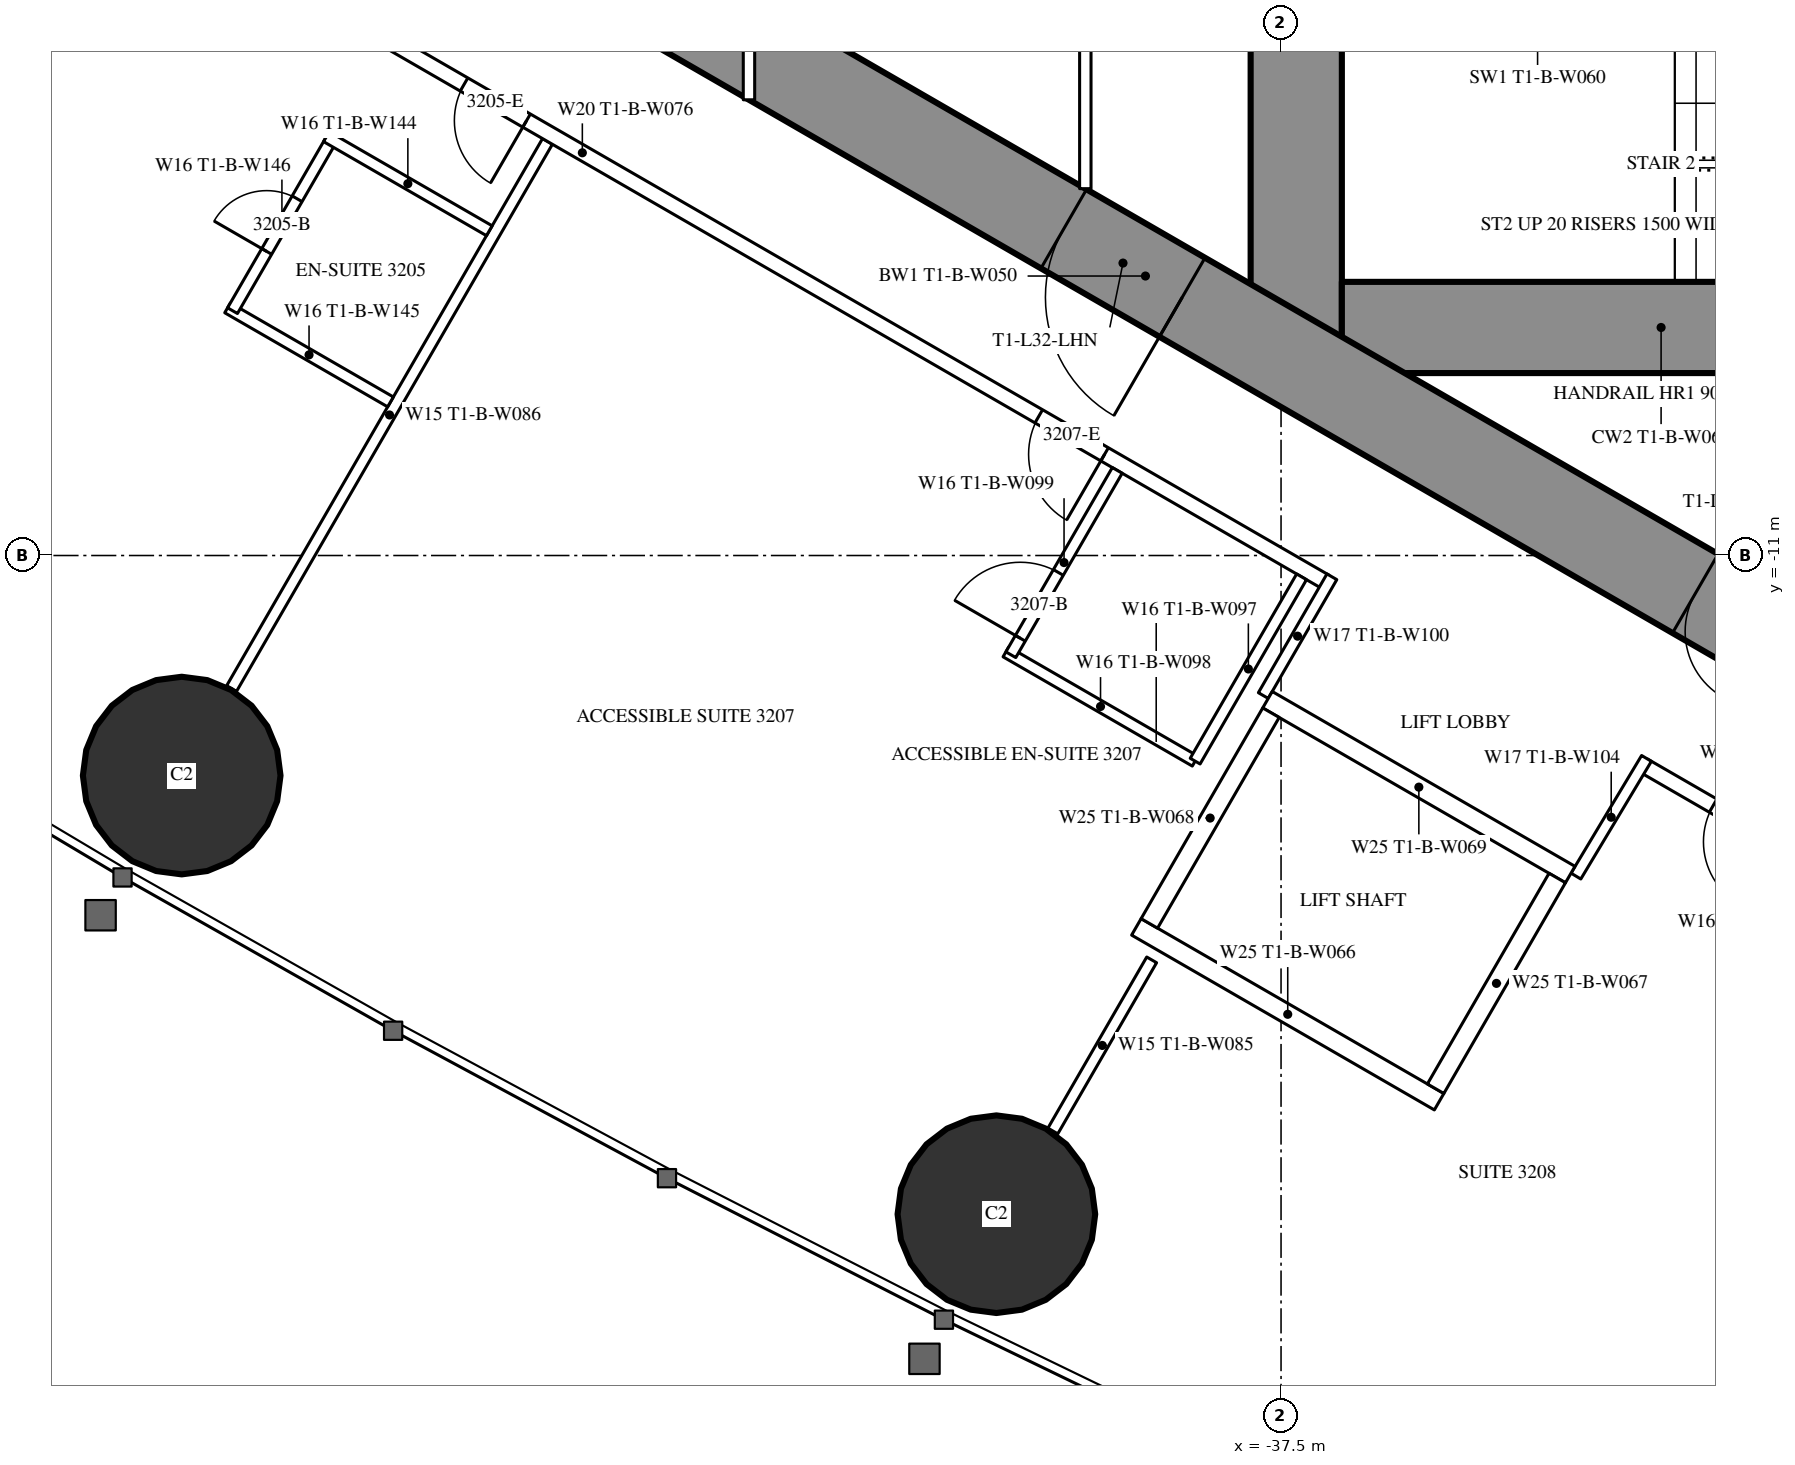
"""IFC4 building model, lengths in metres.
Left out: names, types, materials, properties, quantities, classifications, styles, units other than length and angle.
Written with IfcOpenShell. Run it as: python <this file> out.ifc"""

import sys

from ifc_helpers import new_model, si_unit, direction, frame, frame_2d, origin, origin_2d, place, context, subcontext, project, spatial, rectangle, hollow_circle, extrude, element, fill, save


model = new_model("IFC4")
c1 = context("Model", 3, precision=1e-05, world=origin(), true_north=direction((0.0, 1.0)))
c2 = subcontext(c1, "Body", "Model", "MODEL_VIEW")
j1 = project(units=[si_unit("LENGTHUNIT", "METRE"), si_unit("PLANEANGLEUNIT", "RADIAN")], contexts=[c1])
p1 = place(None, origin())
s1 = spatial("IfcSite", under=j1, at=p1, CompositionType="ELEMENT")
p2 = place(p1, origin())
s2 = spatial("IfcBuilding", under=s1, at=p2, CompositionType="ELEMENT")
p3 = place(p2, frame((0.0, 0.0, 122.1)))
s3 = spatial("IfcBuildingStorey", under=s2, at=p3, CompositionType="ELEMENT", Elevation=122.1)
for number, where, z_axis, x_axis in (
    (1, (-51.963, -13.895, 0.0), (0.0, 0.0, 1.0), (1.0, 0.0, 0.0)),
    (2, (-41.245, -19.666, 0.0), (0.0, 0.0, 1.0), (1.0, 0.0, 0.0)),
):
    element("IfcColumn", number, at=place(p3, frame(where, z_axis=z_axis, x_axis=x_axis)), inside=s3, PredefinedType="COLUMN", context=c2, shape_type="SweptSolid", body=[
        extrude(hollow_circle(Radius=1.3, WallThickness=0.1, at=origin_2d()), origin(), (0.0, 0.0, 1.0), 3.5),
    ])
p4 = place(p3, frame((-37.3, 8.6, 0.0), z_axis=(0.0, 0.0, 1.0), x_axis=(0.0, -1.0, 0.0)))
e3 = element("IfcWall", 3, at=p4, inside=s3, PredefinedType="SHEAR", context=c2, shape_type="SweptSolid", body=[
    extrude(rectangle(XDim=17.2, YDim=1.2, at=frame_2d((8.6, 0.0))), origin(), (0.0, 0.0, 1.0), 3.5),
])
p5 = place(p4, frame((7.7, 0.0, 0.0)))
e4 = element("IfcOpeningElement", 4, at=p5, cuts=e3, PredefinedType="OPENING", context=c2, shape_type="SweptSolid", body=[
    extrude(rectangle(XDim=1.8, YDim=2.2, at=frame_2d((0.9, 1.1))), frame((0.0, 0.61, 0.0), z_axis=(0.0, -1.0, 0.0), x_axis=(1.0, 0.0, 0.0)), (0.0, 0.0, 1.0), 1.22),
])
p6 = place(p3, frame((-28.3, -8.0, 0.0), z_axis=(0.0, 0.0, 1.0), x_axis=(-1.0, 0.0, 0.0)))
e5 = element("IfcWall", 5, at=p6, inside=s3, PredefinedType="SHEAR", context=c2, shape_type="SweptSolid", body=[
    extrude(rectangle(XDim=8.4, YDim=1.2, at=frame_2d((4.2, 0.0))), origin(), (0.0, 0.0, 1.0), 3.5),
])
p7 = place(p6, frame((0.25, 0.0, 0.0)))
e6 = element("IfcOpeningElement", 6, at=p7, cuts=e5, PredefinedType="OPENING", context=c2, shape_type="SweptSolid", body=[
    extrude(rectangle(XDim=1.0, YDim=2.2, at=frame_2d((0.5, 1.1))), frame((0.0, 0.61, 0.0), z_axis=(0.0, -1.0, 0.0), x_axis=(1.0, 0.0, 0.0)), (0.0, 0.0, 1.0), 1.22),
])
p8 = place(p3, frame((-27.2, -14.3, 0.0), z_axis=(0.0, 0.0, 1.0), x_axis=(-0.866024021859, 0.500002393557, 0.0)))
e7 = element("IfcWall", 7, at=p8, inside=s3, PredefinedType="SHEAR", context=c2, shape_type="SweptSolid", body=[
    extrude(rectangle(XDim=27.907, YDim=1.2, at=frame_2d((13.954, 0.0))), origin(), (0.0, 0.0, 1.0), 3.5),
])
p9 = place(p8, frame((4.6, 0.0, 0.0)))
e8 = element("IfcOpeningElement", 8, at=p9, cuts=e7, PredefinedType="OPENING", context=c2, shape_type="SweptSolid", body=[
    extrude(rectangle(XDim=1.0, YDim=2.2, at=frame_2d((0.5, 1.1))), frame((0.0, 0.61, 0.0), z_axis=(0.0, -1.0, 0.0), x_axis=(1.0, 0.0, 0.0)), (0.0, 0.0, 1.0), 1.22),
])
p10 = place(p8, frame((13.395, 0.0, 0.0)))
e9 = element("IfcOpeningElement", 9, at=p10, cuts=e7, PredefinedType="OPENING", context=c2, shape_type="SweptSolid", body=[
    extrude(rectangle(XDim=1.8, YDim=2.2, at=frame_2d((0.9, 1.1))), frame((0.0, 0.61, 0.0), z_axis=(0.0, -1.0, 0.0), x_axis=(1.0, 0.0, 0.0)), (0.0, 0.0, 1.0), 1.22),
])
p11 = place(p3, frame((-47.151, -5.552, 0.0), z_axis=(0.0, 0.0, 1.0), x_axis=(-0.500003012045, -0.866023664773, 0.0)))
e10 = element("IfcWall", 10, at=p11, inside=s3, PredefinedType="PARTITIONING", context=c2, shape_type="SweptSolid", body=[
    extrude(rectangle(XDim=8.311, YDim=0.15, at=frame_2d((4.156, 0.0))), origin(), (0.0, 0.0, 1.0), 2.2),
])
p12 = place(p3, frame((-39.202, -16.32, 0.0), z_axis=(0.0, 0.0, 1.0), x_axis=(-0.49997716683, -0.86603858612, 0.0)))
e11 = element("IfcWall", 11, at=p12, inside=s3, PredefinedType="PARTITIONING", context=c2, shape_type="SweptSolid", body=[
    extrude(rectangle(XDim=2.6, YDim=0.15, at=frame_2d((1.3, 0.0))), origin(), (0.0, 0.0, 1.0), 3.25),
])
p13 = place(p3, frame((-27.572, -16.741, 0.0), z_axis=(0.0, 0.0, 1.0), x_axis=(-0.866024464444, 0.500001626982, 0.0)))
e12 = element("IfcWall", 12, at=p13, inside=s3, PredefinedType="PARTITIONING", context=c2, shape_type="SweptSolid", body=[
    extrude(rectangle(XDim=5.955, YDim=0.2, at=frame_2d((2.978, 0.0))), origin(), (0.0, 0.0, 1.0), 3.25),
])
p14 = place(p13, frame((3.95, 0.0, 0.0)))
e13 = element("IfcOpeningElement", 13, at=p14, cuts=e12, PredefinedType="OPENING", context=c2, shape_type="SweptSolid", body=[
    extrude(rectangle(XDim=0.95, YDim=2.2, at=frame_2d((0.475, 1.1))), frame((0.0, 0.11, 0.0), z_axis=(0.0, -1.0, 0.0), x_axis=(1.0, 0.0, 0.0)), (0.0, 0.0, 1.0), 0.22),
])
p15 = place(p3, frame((-36.92, -11.344, 0.0), z_axis=(0.0, 0.0, 1.0), x_axis=(-0.866028313256, 0.499994960614, 0.0)))
e14 = element("IfcWall", 14, at=p15, inside=s3, PredefinedType="PARTITIONING", context=c2, shape_type="SweptSolid", body=[
    extrude(rectangle(XDim=22.568, YDim=0.2, at=frame_2d((11.284, 0.0))), origin(), (0.0, 0.0, 1.0), 3.25),
])
p16 = place(p15, frame((12.131, 0.0, 0.0)))
e15 = element("IfcOpeningElement", 15, at=p16, cuts=e14, PredefinedType="OPENING", context=c2, shape_type="SweptSolid", body=[
    extrude(rectangle(XDim=0.95, YDim=2.2, at=frame_2d((0.475, 1.1))), frame((0.0, 0.11, 0.0), z_axis=(0.0, -1.0, 0.0), x_axis=(1.0, 0.0, 0.0)), (0.0, 0.0, 1.0), 0.22),
])
p17 = place(p15, frame((3.35, 0.0, 0.0)))
e16 = element("IfcOpeningElement", 16, at=p17, cuts=e14, PredefinedType="OPENING", context=c2, shape_type="SweptSolid", body=[
    extrude(rectangle(XDim=1.0, YDim=2.2, at=frame_2d((0.5, 1.1))), frame((0.0, 0.11, 0.0), z_axis=(0.0, -1.0, 0.0), x_axis=(1.0, 0.0, 0.0)), (0.0, 0.0, 1.0), 0.22),
])
p18 = place(p3, frame((-36.831, -11.28, 0.0), z_axis=(0.0, 0.0, 1.0), x_axis=(-0.499937177781, -0.866061671171, 0.0)))
e17 = element("IfcWall", 17, at=p18, inside=s3, PredefinedType="PARTITIONING", context=c2, shape_type="SweptSolid", body=[
    extrude(rectangle(XDim=1.804, YDim=0.15, at=frame_2d((0.902, 0.0))), origin(), (0.0, 0.0, 1.0), 3.25),
])
p19 = place(p3, frame((-33.621, -15.218, 0.0), z_axis=(0.0, 0.0, 1.0), x_axis=(0.514336634837, 0.857588377991, 0.0)))
e18 = element("IfcWall", 18, at=p19, inside=s3, PredefinedType="PARTITIONING", context=c2, shape_type="SweptSolid", body=[
    extrude(rectangle(XDim=1.805, YDim=0.15, at=frame_2d((0.903, 0.0))), origin(), (0.0, 0.0, 1.0), 3.25),
])
p20 = place(p3, frame((-49.216, -8.979, 0.0), z_axis=(0.0, 0.0, 1.0), x_axis=(-0.866031185235, 0.4999899861, 0.0)))
e19 = element("IfcWall", 19, at=p20, inside=s3, PredefinedType="PARTITIONING", context=c2, shape_type="SweptSolid", body=[
    extrude(rectangle(XDim=2.475, YDim=0.15, at=frame_2d((1.238, 0.0))), origin(), (0.0, 0.0, 1.0), 3.25),
])
p21 = place(p3, frame((-49.995, -5.527, 0.0), z_axis=(0.0, 0.0, 1.0), x_axis=(-0.500006934395, -0.866021400173, 0.0)))
e20 = element("IfcWall", 20, at=p21, inside=s3, PredefinedType="PARTITIONING", context=c2, shape_type="SweptSolid", body=[
    extrude(rectangle(XDim=2.6, YDim=0.15, at=frame_2d((1.3, 0.0))), origin(), (0.0, 0.0, 1.0), 3.25),
])
p22 = place(p21, frame((0.9, 0.0, 0.0)))
e21 = element("IfcOpeningElement", 21, at=p22, cuts=e20, PredefinedType="OPENING", context=c2, shape_type="SweptSolid", body=[
    extrude(rectangle(XDim=0.8, YDim=2.2, at=frame_2d((0.4, 1.1))), frame((0.0, 0.085, 0.0), z_axis=(0.0, -1.0, 0.0), x_axis=(1.0, 0.0, 0.0)), (0.0, 0.0, 1.0), 0.17),
])
p23 = place(p3, frame((-47.916, -6.727, 0.0), z_axis=(0.0, 0.0, 1.0), x_axis=(-0.866031185235, 0.4999899861, 0.0)))
e22 = element("IfcWall", 22, at=p23, inside=s3, PredefinedType="PARTITIONING", context=c2, shape_type="SweptSolid", body=[
    extrude(rectangle(XDim=2.475, YDim=0.15, at=frame_2d((1.238, 0.0))), origin(), (0.0, 0.0, 1.0), 3.25),
])
p24 = place(p3, frame((-38.63, -13.705, 0.0), z_axis=(0.0, 0.0, 1.0), x_axis=(-0.866018712932, 0.500011588718, 0.0)))
e23 = element("IfcWall", 23, at=p24, inside=s3, PredefinedType="PARTITIONING", context=c2, shape_type="SweptSolid", body=[
    extrude(rectangle(XDim=2.875, YDim=0.15, at=frame_2d((1.438, 0.0))), origin(), (0.0, 0.0, 1.0), 3.25),
])
p25 = place(p3, frame((-39.655, -9.88, 0.0), z_axis=(0.0, 0.0, 1.0), x_axis=(-0.500049511043, -0.865996816683, 0.0)))
e24 = element("IfcWall", 24, at=p25, inside=s3, PredefinedType="PARTITIONING", context=c2, shape_type="SweptSolid", body=[
    extrude(rectangle(XDim=2.8, YDim=0.15, at=frame_2d((1.4, 0.0))), origin(), (0.0, 0.0, 1.0), 3.25),
])
p26 = place(p25, frame((1.55, 0.0, 0.0)))
e25 = element("IfcOpeningElement", 25, at=p26, cuts=e24, PredefinedType="OPENING", context=c2, shape_type="SweptSolid", body=[
    extrude(rectangle(XDim=1.0, YDim=2.2, at=frame_2d((0.5, 1.1))), frame((0.0, 0.085, 0.0), z_axis=(0.0, -1.0, 0.0), x_axis=(1.0, 0.0, 0.0)), (0.0, 0.0, 1.0), 0.17),
])
p27 = place(p3, frame((-37.23, -11.281, 0.0), z_axis=(0.0, 0.0, 1.0), x_axis=(-0.500049511043, -0.865996816683, 0.0)))
e26 = element("IfcWall", 26, at=p27, inside=s3, PredefinedType="PARTITIONING", context=c2, shape_type="SweptSolid", body=[
    extrude(rectangle(XDim=2.8, YDim=0.15, at=frame_2d((1.4, 0.0))), origin(), (0.0, 0.0, 1.0), 3.25),
])
p28 = place(p3, frame((-40.075, 1.2, 0.0), z_axis=(0.0, 0.0, 1.0), x_axis=(0.0, -1.0, 0.0)))
e27 = element("IfcWall", 27, at=p28, inside=s3, PredefinedType="PARTITIONING", context=c2, shape_type="SweptSolid", body=[
    extrude(rectangle(XDim=7.374, YDim=0.15, at=frame_2d((3.687, 0.0))), origin(), (0.0, 0.0, 1.0), 3.25),
])
p29 = place(p28, frame((2.787, 0.0, 0.0)))
e28 = element("IfcOpeningElement", 28, at=p29, cuts=e27, PredefinedType="OPENING", context=c2, shape_type="SweptSolid", body=[
    extrude(rectangle(XDim=1.8, YDim=2.2, at=frame_2d((0.9, 1.1))), frame((0.0, 0.085, 0.0), z_axis=(0.0, -1.0, 0.0), x_axis=(1.0, 0.0, 0.0)), (0.0, 0.0, 1.0), 0.17),
])
p30 = place(p3, frame((-44.5, 5.005, 0.0), z_axis=(0.0, 0.0, 1.0), x_axis=(0.0, -1.0, 0.0)))
e29 = element("IfcWall", 29, at=p30, inside=s3, PredefinedType="PARTITIONING", context=c2, shape_type="SweptSolid", body=[
    extrude(rectangle(XDim=10.009, YDim=0.15, at=frame_2d((5.005, 0.0))), origin(), (0.0, 0.0, 1.0), 2.45),
])
p31 = place(p30, frame((2.002, 0.0, 0.0)))
e30 = element("IfcOpeningElement", 30, at=p31, cuts=e29, PredefinedType="OPENING", context=c2, shape_type="SweptSolid", body=[
    extrude(rectangle(XDim=1.0, YDim=2.2, at=frame_2d((0.5, 1.1))), frame((0.0, 0.085, 0.0), z_axis=(0.0, -1.0, 0.0), x_axis=(1.0, 0.0, 0.0)), (0.0, 0.0, 1.0), 0.17),
])
p32 = place(p30, frame((7.007, 0.0, 0.0)))
e31 = element("IfcOpeningElement", 31, at=p32, cuts=e29, PredefinedType="OPENING", context=c2, shape_type="SweptSolid", body=[
    extrude(rectangle(XDim=1.0, YDim=2.2, at=frame_2d((0.5, 1.1))), frame((0.0, 0.085, 0.0), z_axis=(0.0, -1.0, 0.0), x_axis=(1.0, 0.0, 0.0)), (0.0, 0.0, 1.0), 0.17),
])
p33 = place(p3, frame((-33.696, -15.197, 0.0), z_axis=(0.0, 0.0, 1.0), x_axis=(-0.865976953817, 0.500083908417, 0.0)))
e32 = element("IfcWall", 32, at=p33, inside=s3, PredefinedType="PARTITIONING", context=c2, shape_type="SweptSolid", body=[
    extrude(rectangle(XDim=4.599, YDim=0.25, at=frame_2d((2.3, 0.0))), origin(), (0.0, 0.0, 1.0), 3.25),
])
p34 = place(p3, frame((-35.42, -18.186, 0.0), z_axis=(0.0, 0.0, 1.0), x_axis=(-0.865990227814, 0.50006092162, 0.0)))
e33 = element("IfcWall", 33, at=p34, inside=s3, PredefinedType="PARTITIONING", context=c2, shape_type="SweptSolid", body=[
    extrude(rectangle(XDim=4.6, YDim=0.25, at=frame_2d((2.3, 0.0))), origin(), (0.0, 0.0, 1.0), 3.25),
])
p35 = place(p3, frame((-33.866, -15.243, 0.0), z_axis=(0.0, 0.0, 1.0), x_axis=(-0.499929347863, -0.866066190972, 0.0)))
e34 = element("IfcWall", 34, at=p35, inside=s3, PredefinedType="PARTITIONING", context=c2, shape_type="SweptSolid", body=[
    extrude(rectangle(XDim=3.201, YDim=0.25, at=frame_2d((1.6, 0.0))), origin(), (0.0, 0.0, 1.0), 3.25),
])
p36 = place(p3, frame((-37.633, -13.068, 0.0), z_axis=(0.0, 0.0, 1.0), x_axis=(-0.499872130319, -0.866099216793, 0.0)))
e35 = element("IfcWall", 35, at=p36, inside=s3, PredefinedType="PARTITIONING", context=c2, shape_type="SweptSolid", body=[
    extrude(rectangle(XDim=3.2, YDim=0.25, at=frame_2d((1.6, 0.0))), origin(), (0.0, 0.0, 1.0), 3.25),
])
p37 = place(p22, origin())
e36 = element("IfcDoor", 36, at=p37, inside=s3, OperationType="SINGLE_SWING_RIGHT", PredefinedType="DOOR", context=c2, shape_type="SweptSolid", body=[
    extrude(rectangle(XDim=0.8, YDim=2.2, at=frame_2d((0.4, 1.1))), frame((0.0, 0.025, 0.0), z_axis=(0.0, -1.0, 0.0), x_axis=(1.0, 0.0, 0.0)), (0.0, 0.0, 1.0), 0.05),
])
fill(e21, e36)
p38 = place(p16, origin())
e37 = element("IfcDoor", 37, at=p38, inside=s3, OperationType="SINGLE_SWING_LEFT", PredefinedType="DOOR", context=c2, shape_type="SweptSolid", body=[
    extrude(rectangle(XDim=0.95, YDim=2.2, at=frame_2d((0.475, 1.1))), frame((0.0, 0.025, 0.0), z_axis=(0.0, -1.0, 0.0), x_axis=(1.0, 0.0, 0.0)), (0.0, 0.0, 1.0), 0.05),
])
fill(e15, e37)
p39 = place(p26, origin())
e38 = element("IfcDoor", 38, at=p39, inside=s3, OperationType="SINGLE_SWING_RIGHT", PredefinedType="DOOR", context=c2, shape_type="SweptSolid", body=[
    extrude(rectangle(XDim=1.0, YDim=2.2, at=frame_2d((0.5, 1.1))), frame((0.0, 0.025, 0.0), z_axis=(0.0, -1.0, 0.0), x_axis=(1.0, 0.0, 0.0)), (0.0, 0.0, 1.0), 0.05),
])
fill(e25, e38)
p40 = place(p17, origin())
e39 = element("IfcDoor", 39, at=p40, inside=s3, OperationType="SINGLE_SWING_LEFT", PredefinedType="DOOR", context=c2, shape_type="SweptSolid", body=[
    extrude(rectangle(XDim=1.0, YDim=2.2, at=frame_2d((0.5, 1.1))), frame((0.0, 0.025, 0.0), z_axis=(0.0, -1.0, 0.0), x_axis=(1.0, 0.0, 0.0)), (0.0, 0.0, 1.0), 0.05),
])
fill(e16, e39)
p41 = place(p14, origin())
e40 = element("IfcDoor", 40, at=p41, inside=s3, OperationType="SINGLE_SWING_LEFT", PredefinedType="DOOR", context=c2, shape_type="SweptSolid", body=[
    extrude(rectangle(XDim=0.95, YDim=2.2, at=frame_2d((0.475, 1.1))), frame((0.0, 0.025, 0.0), z_axis=(0.0, -1.0, 0.0), x_axis=(1.0, 0.0, 0.0)), (0.0, 0.0, 1.0), 0.05),
])
fill(e13, e40)
p42 = place(p9, origin())
e41 = element("IfcDoor", 41, at=p42, inside=s3, OperationType="SINGLE_SWING_LEFT", PredefinedType="DOOR", context=c2, shape_type="SweptSolid", body=[
    extrude(rectangle(XDim=1.0, YDim=2.2, at=frame_2d((0.5, 1.1))), frame((0.0, 0.025, 0.0), z_axis=(0.0, -1.0, 0.0), x_axis=(1.0, 0.0, 0.0)), (0.0, 0.0, 1.0), 0.05),
])
fill(e8, e41)
p43 = place(p10, origin())
e42 = element("IfcDoor", 42, at=p43, inside=s3, OperationType="DOUBLE_DOOR_SINGLE_SWING", PredefinedType="DOOR", context=c2, shape_type="SweptSolid", body=[
    extrude(rectangle(XDim=1.8, YDim=2.2, at=frame_2d((0.9, 1.1))), frame((0.0, 0.025, 0.0), z_axis=(0.0, -1.0, 0.0), x_axis=(1.0, 0.0, 0.0)), (0.0, 0.0, 1.0), 0.05),
])
fill(e9, e42)
save(model, sys.argv[1])
